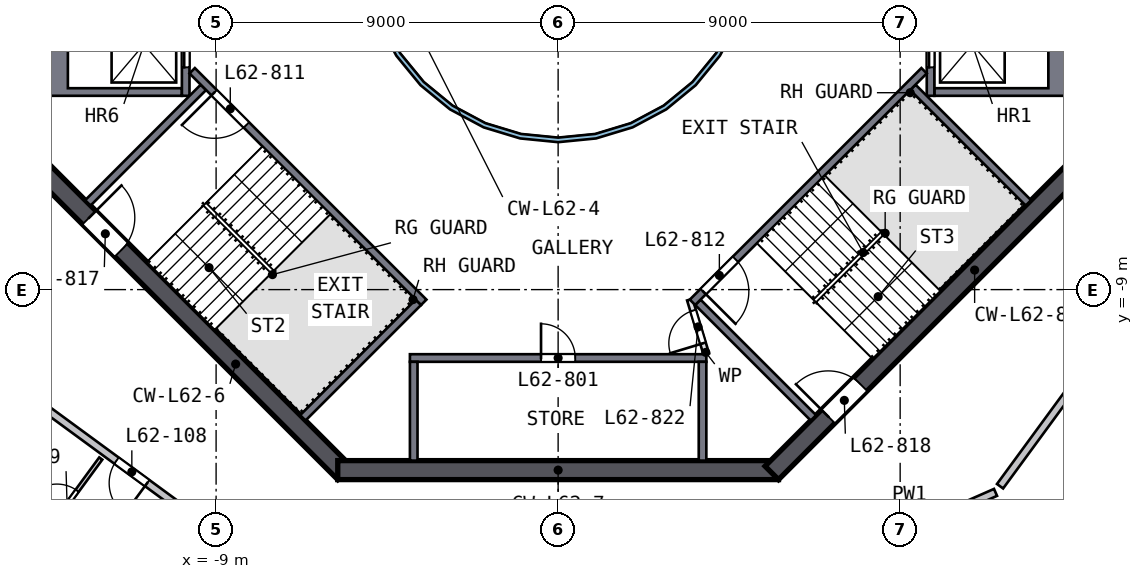
"""IFC4 building model, lengths in metres.
Left out: names, types, materials, properties, quantities, classifications, styles, units other than length and angle.
Written with IfcOpenShell. Run it as: python <this file> out.ifc"""

import sys

from ifc_helpers import new_model, si_unit, direction, frame, frame_2d, origin, place, context, subcontext, project, spatial, polyline, rectangle, outline, extrude, element, fill, save


model = new_model("IFC4")
c1 = context("Model", 3, precision=1e-05, world=origin(), true_north=direction((0.0, 1.0)))
c2 = subcontext(c1, "Body", "Model", "MODEL_VIEW")
j1 = project(units=[si_unit("LENGTHUNIT", "METRE"), si_unit("PLANEANGLEUNIT", "RADIAN")], contexts=[c1])
p1 = place(None, origin())
s1 = spatial("IfcSite", under=j1, at=p1, CompositionType="ELEMENT")
p2 = place(p1, origin())
s2 = spatial("IfcBuilding", under=s1, at=p2, CompositionType="ELEMENT")
p3 = place(p2, frame((0.0, 0.0, 252.5)))
s3 = spatial("IfcBuildingStorey", under=s2, at=p3, CompositionType="ELEMENT", Elevation=252.5)
p4 = place(p3, frame((-13.823, -5.622, 0.0), z_axis=(0.0, 0.0, 1.0), x_axis=(0.707106781, -0.707106781, 0.0)))
e1 = element("IfcWall", 1, at=p4, inside=s3, PredefinedType="SHEAR", context=c2, shape_type="SweptSolid", body=[
    extrude(rectangle(XDim=11.598, YDim=0.5, at=frame_2d((5.799, 0.0))), origin(), (0.0, 0.0, 1.0), 3.5),
])
p5 = place(p4, frame((2.099, 0.0, 0.0)))
e2 = element("IfcOpeningElement", 2, at=p5, cuts=e1, PredefinedType="OPENING", context=c2, shape_type="SweptSolid", body=[
    extrude(rectangle(XDim=1.2, YDim=2.1, at=frame_2d((0.6, 1.05))), frame((0.0, 0.26, 0.0), z_axis=(0.0, -1.0, 0.0), x_axis=(1.0, 0.0, 0.0)), (0.0, 0.0, 1.0), 0.52),
])
p6 = place(p3, frame((-5.799, -13.75, 0.0), z_axis=(0.0, 0.0, 1.0), x_axis=(1.0, 0.0, 0.0)))
e3 = element("IfcWall", 3, at=p6, inside=s3, PredefinedType="SHEAR", context=c2, shape_type="SweptSolid", body=[
    extrude(rectangle(XDim=11.598, YDim=0.5, at=frame_2d((5.799, 0.0))), origin(), (0.0, 0.0, 1.0), 3.5),
])
p7 = place(p3, frame((5.622, -13.823, 0.0), z_axis=(0.0, 0.0, 1.0), x_axis=(0.707106781, 0.707106781, 0.0)))
e4 = element("IfcWall", 4, at=p7, inside=s3, PredefinedType="SHEAR", context=c2, shape_type="SweptSolid", body=[
    extrude(rectangle(XDim=11.598, YDim=0.5, at=frame_2d((5.799, 0.0))), origin(), (0.0, 0.0, 1.0), 3.5),
])
p8 = place(p7, frame((2.099, 0.0, 0.0)))
e5 = element("IfcOpeningElement", 5, at=p8, cuts=e4, PredefinedType="OPENING", context=c2, shape_type="SweptSolid", body=[
    extrude(rectangle(XDim=1.2, YDim=2.1, at=frame_2d((0.6, 1.05))), frame((0.0, 0.26, 0.0), z_axis=(0.0, -1.0, 0.0), x_axis=(1.0, 0.0, 0.0)), (0.0, 0.0, 1.0), 0.52),
])
p9 = place(p3, origin())
e6 = element("IfcWall", 6, at=p9, inside=s3, PredefinedType="SOLIDWALL", context=c2, shape_type="SweptSolid", body=[
    extrude(outline(polyline([(13.5, -3.9), (9.9, -3.9), (9.9, -3.7), (12.9, -3.7), (12.9, -1.4), (9.9, -1.4), (9.9, -1.2), (13.5, -1.2), (13.5, -3.9)])), origin(), (0.0, 0.0, 1.0), 3.19),
])
p10 = place(p3, frame((9.8, -1.2, 0.0), z_axis=(0.0, 0.0, 1.0), x_axis=(0.0, -1.0, 0.0)))
e7 = element("IfcWall", 7, at=p10, inside=s3, PredefinedType="SOLIDWALL", context=c2, shape_type="SweptSolid", body=[
    extrude(rectangle(XDim=2.7, YDim=0.2, at=frame_2d((1.35, 0.0))), origin(), (0.0, 0.0, 1.0), 3.19),
])
p11 = place(p10, frame((0.75, 0.0, 0.0)))
e8 = element("IfcOpeningElement", 8, at=p11, cuts=e7, PredefinedType="OPENING", context=c2, shape_type="SweptSolid", body=[
    extrude(rectangle(XDim=1.2, YDim=2.1, at=frame_2d((0.6, 1.05))), frame((0.0, 0.11, 0.0), z_axis=(0.0, -1.0, 0.0), x_axis=(1.0, 0.0, 0.0)), (0.0, 0.0, 1.0), 0.22),
])
p12 = place(p3, origin())
e9 = element("IfcWall", 9, at=p12, inside=s3, PredefinedType="SOLIDWALL", context=c2, shape_type="SweptSolid", body=[
    extrude(outline(polyline([(-13.5, -3.9), (-13.5, -1.2), (-9.9, -1.2), (-9.9, -1.4), (-12.9, -1.4), (-12.9, -3.7), (-9.9, -3.7), (-9.9, -3.9), (-13.5, -3.9)])), origin(), (0.0, 0.0, 1.0), 3.19),
])
p13 = place(p3, frame((-9.8, -1.2, 0.0), z_axis=(0.0, 0.0, 1.0), x_axis=(0.0, -1.0, 0.0)))
e10 = element("IfcWall", 10, at=p13, inside=s3, PredefinedType="SOLIDWALL", context=c2, shape_type="SweptSolid", body=[
    extrude(rectangle(XDim=2.7, YDim=0.2, at=frame_2d((1.35, 0.0))), origin(), (0.0, 0.0, 1.0), 3.19),
])
p14 = place(p13, frame((0.75, 0.0, 0.0)))
e11 = element("IfcOpeningElement", 11, at=p14, cuts=e10, PredefinedType="OPENING", context=c2, shape_type="SweptSolid", body=[
    extrude(rectangle(XDim=1.2, YDim=2.1, at=frame_2d((0.6, 1.05))), frame((0.0, 0.11, 0.0), z_axis=(0.0, -1.0, 0.0), x_axis=(1.0, 0.0, 0.0)), (0.0, 0.0, 1.0), 0.22),
])
p15 = place(p3, frame((-3.9, -10.8, 0.0), z_axis=(0.0, 0.0, 1.0), x_axis=(1.0, 0.0, 0.0)))
e12 = element("IfcWall", 12, at=p15, inside=s3, PredefinedType="SOLIDWALL", context=c2, shape_type="SweptSolid", body=[
    extrude(rectangle(XDim=7.8, YDim=0.2, at=frame_2d((3.9, 0.0))), origin(), (0.0, 0.0, 1.0), 3.19),
])
p16 = place(p15, frame((3.45, 0.0, 0.0)))
e13 = element("IfcOpeningElement", 13, at=p16, cuts=e12, PredefinedType="OPENING", context=c2, shape_type="SweptSolid", body=[
    extrude(rectangle(XDim=0.9, YDim=2.1, at=frame_2d((0.45, 1.05))), frame((0.0, 0.11, 0.0), z_axis=(0.0, -1.0, 0.0), x_axis=(1.0, 0.0, 0.0)), (0.0, 0.0, 1.0), 0.22),
])
for number, where, z_axis, x_axis in (
    (14, (-3.8, -10.9, 0.0), (0.0, 0.0, 1.0), (0.0, -1.0, 0.0)),
    (15, (3.8, -10.9, 0.0), (0.0, 0.0, 1.0), (0.0, -1.0, 0.0)),
):
    element("IfcWall", number, at=place(p3, frame(where, z_axis=z_axis, x_axis=x_axis)), inside=s3, PredefinedType="SOLIDWALL", context=c2, shape_type="SweptSolid", body=[
        extrude(rectangle(XDim=2.6, YDim=0.2, at=frame_2d((1.3, 0.0))), origin(), (0.0, 0.0, 1.0), 3.19),
    ])
p17 = place(p3, frame((-3.535, -9.334, 0.0), z_axis=(0.0, 0.0, 1.0), x_axis=(-0.707120946, 0.707092617, 0.0)))
e16 = element("IfcWall", 16, at=p17, inside=s3, PredefinedType="SOLIDWALL", context=c2, shape_type="SweptSolid", body=[
    extrude(rectangle(XDim=8.618, YDim=0.2, at=frame_2d((4.309, 0.0))), origin(), (0.0, 0.0, 1.0), 3.19),
])
p18 = place(p17, frame((6.6, 0.0, 0.0)))
e17 = element("IfcOpeningElement", 17, at=p18, cuts=e16, PredefinedType="OPENING", context=c2, shape_type="SweptSolid", body=[
    extrude(rectangle(XDim=1.2, YDim=2.1, at=frame_2d((0.6, 1.05))), frame((0.0, 0.11, 0.0), z_axis=(0.0, -1.0, 0.0), x_axis=(1.0, 0.0, 0.0)), (0.0, 0.0, 1.0), 0.22),
])
for number, where, z_axis, x_axis in (
    (18, (-9.334, -3.677, 0.0), (0.0, 0.0, 1.0), (-0.707, -0.707, 0.0)),
    (19, (-3.677, -9.334, 0.0), (0.0, 0.0, 1.0), (-0.707, -0.707, 0.0)),
):
    element("IfcWall", number, at=place(p3, frame(where, z_axis=z_axis, x_axis=x_axis)), inside=s3, PredefinedType="SOLIDWALL", context=c2, shape_type="SweptSolid", body=[
        extrude(rectangle(XDim=4.3, YDim=0.2, at=frame_2d((2.15, 0.0))), origin(), (0.0, 0.0, 1.0), 3.19),
    ])
p19 = place(p3, frame((9.629, -3.24, 0.0), z_axis=(0.0, 0.0, 1.0), x_axis=(-0.707120946, -0.707092617, 0.0)))
e20 = element("IfcWall", 20, at=p19, inside=s3, PredefinedType="SOLIDWALL", context=c2, shape_type="SweptSolid", body=[
    extrude(rectangle(XDim=8.618, YDim=0.2, at=frame_2d((4.309, 0.0))), origin(), (0.0, 0.0, 1.0), 3.19),
])
p20 = place(p19, frame((7.018, 0.0, 0.0)))
e21 = element("IfcOpeningElement", 21, at=p20, cuts=e20, PredefinedType="OPENING", context=c2, shape_type="SweptSolid", body=[
    extrude(rectangle(XDim=1.2, YDim=2.1, at=frame_2d((0.6, 1.05))), frame((0.0, 0.11, 0.0), z_axis=(0.0, -1.0, 0.0), x_axis=(1.0, 0.0, 0.0)), (0.0, 0.0, 1.0), 0.22),
])
for number, where, z_axis, x_axis in (
    (22, (3.677, -9.334, 0.0), (0.0, 0.0, 1.0), (0.707, -0.707, 0.0)),
    (23, (9.334, -3.677, 0.0), (0.0, 0.0, 1.0), (0.707, -0.707, 0.0)),
):
    element("IfcWall", number, at=place(p3, frame(where, z_axis=z_axis, x_axis=x_axis)), inside=s3, PredefinedType="SOLIDWALL", context=c2, shape_type="SweptSolid", body=[
        extrude(rectangle(XDim=4.3, YDim=0.2, at=frame_2d((2.15, 0.0))), origin(), (0.0, 0.0, 1.0), 3.19),
    ])
p21 = place(p3, frame((3.9, -10.7, 0.0), z_axis=(0.0, 0.0, 1.0), x_axis=(-0.289808785, 0.957084567, 0.0)))
e24 = element("IfcWall", 24, at=p21, inside=s3, PredefinedType="PARTITIONING", context=c2, shape_type="SweptSolid", body=[
    extrude(rectangle(XDim=1.501, YDim=0.15, at=frame_2d((0.75, 0.0))), origin(), (0.0, 0.0, 1.0), 3.19),
])
p22 = place(p21, frame((0.301, 0.0, 0.0)))
e25 = element("IfcOpeningElement", 25, at=p22, cuts=e24, PredefinedType="OPENING", context=c2, shape_type="SweptSolid", body=[
    extrude(rectangle(XDim=0.9, YDim=2.1, at=frame_2d((0.45, 1.05))), frame((0.0, 0.085, 0.0), z_axis=(0.0, -1.0, 0.0), x_axis=(1.0, 0.0, 0.0)), (0.0, 0.0, 1.0), 0.17),
])
p23 = place(p3, origin())
e26 = element("IfcWall", 26, at=p23, inside=s3, PredefinedType="SOLIDWALL", context=c2, shape_type="SweptSolid", body=[
    extrude(outline(polyline([(5.021, -0.999), (4.73, -1.959), (4.257, -2.844), (3.62, -3.62), (2.844, -4.257), (1.959, -4.73), (0.999, -5.021), (0.0, -5.12), (-0.999, -5.021), (-1.959, -4.73), (-2.844, -4.257), (-3.62, -3.62), (-4.257, -2.844), (-4.73, -1.959), (-5.021, -0.999), (-5.12, 0.0), (-5.021, 0.999), (-4.73, 1.959), (-4.257, 2.844), (-3.62, 3.62), (-2.844, 4.257), (-1.959, 4.73), (-0.999, 5.021), (0.0, 5.12), (0.999, 5.021), (1.959, 4.73), (2.844, 4.257), (3.62, 3.62), (4.257, 2.844), (4.73, 1.959), (5.021, 0.999), (5.12, 0.0), (5.021, -0.999)]), holes=[polyline([(4.904, 0.976), (4.619, 1.913), (4.157, 2.778), (3.535, 3.535), (2.778, 4.157), (1.913, 4.619), (0.976, 4.904), (0.0, 5.0), (-0.976, 4.904), (-1.913, 4.619), (-2.778, 4.157), (-3.535, 3.535), (-4.157, 2.778), (-4.619, 1.913), (-4.904, 0.976), (-5.0, 0.0), (-4.904, -0.976), (-4.619, -1.913), (-4.157, -2.778), (-3.535, -3.535), (-2.778, -4.157), (-1.913, -4.619), (-0.976, -4.904), (0.0, -5.0), (0.976, -4.904), (1.913, -4.619), (2.778, -4.157), (3.535, -3.535), (4.157, -2.778), (4.619, -1.913), (4.904, -0.976), (5.0, 0.0), (4.904, 0.976)])]), origin(), (0.0, 0.0, 1.0), 3.19),
])
p24 = place(p3, frame((-6.66, -17.136, 0.0), z_axis=(0.0, 0.0, 1.0), x_axis=(-0.806536607, 0.591184152, 0.0)))
e27 = element("IfcWall", 27, at=p24, inside=s3, PredefinedType="SOLIDWALL", context=c2, shape_type="SweptSolid", body=[
    extrude(rectangle(XDim=9.317, YDim=0.2, at=frame_2d((4.658, 0.0))), origin(), (0.0, 0.0, 1.0), 3.19),
])
p25 = place(p24, frame((5.15, 0.0, 0.0)))
e28 = element("IfcOpeningElement", 28, at=p25, cuts=e27, PredefinedType="OPENING", context=c2, shape_type="SweptSolid", body=[
    extrude(rectangle(XDim=1.0, YDim=2.1, at=frame_2d((0.5, 1.05))), frame((0.0, 0.11, 0.0), z_axis=(0.0, -1.0, 0.0), x_axis=(1.0, 0.0, 0.0)), (0.0, 0.0, 1.0), 0.22),
])
p26 = place(p3, frame((11.51, -14.336, 0.0), z_axis=(0.0, 0.0, 1.0), x_axis=(-0.915247397, -0.402892297, 0.0)))
e29 = element("IfcWall", 29, at=p26, inside=s3, PredefinedType="SOLIDWALL", context=c2, shape_type="SweptSolid", body=[
    extrude(rectangle(XDim=9.316, YDim=0.2, at=frame_2d((4.658, 0.0))), origin(), (0.0, 0.0, 1.0), 3.19),
])
p27 = place(p26, frame((5.15, 0.0, 0.0)))
e30 = element("IfcOpeningElement", 30, at=p27, cuts=e29, PredefinedType="OPENING", context=c2, shape_type="SweptSolid", body=[
    extrude(rectangle(XDim=1.0, YDim=2.1, at=frame_2d((0.5, 1.05))), frame((0.0, 0.11, 0.0), z_axis=(0.0, -1.0, 0.0), x_axis=(1.0, 0.0, 0.0)), (0.0, 0.0, 1.0), 0.22),
])
p28 = place(p3, frame((17.017, -6.822, 0.0), z_axis=(0.0, 0.0, 1.0), x_axis=(-0.591166262, -0.80654972, 0.0)))
e31 = element("IfcWall", 31, at=p28, inside=s3, PredefinedType="SOLIDWALL", context=c2, shape_type="SweptSolid", body=[
    extrude(rectangle(XDim=9.116, YDim=0.2, at=frame_2d((4.558, 0.0))), origin(), (0.0, 0.0, 1.0), 3.19),
])
p29 = place(p28, frame((0.2, 0.0, 0.0)))
e32 = element("IfcOpeningElement", 32, at=p29, cuts=e31, PredefinedType="OPENING", context=c2, shape_type="SweptSolid", body=[
    extrude(rectangle(XDim=1.0, YDim=2.1, at=frame_2d((0.5, 1.05))), frame((0.0, 0.11, 0.0), z_axis=(0.0, -1.0, 0.0), x_axis=(1.0, 0.0, 0.0)), (0.0, 0.0, 1.0), 0.22),
])
p30 = place(p3, frame((-13.867, -15.945, 0.0), z_axis=(0.0, 0.0, 1.0), x_axis=(0.591155368, 0.806557704, 0.0)))
e33 = element("IfcWall", 33, at=p30, inside=s3, PredefinedType="PARTITIONING", context=c2, shape_type="SweptSolid", body=[
    extrude(rectangle(XDim=3.1, YDim=0.1, at=frame_2d((1.55, 0.0))), origin(), (0.0, 0.0, 1.0), 3.19),
])
p31 = place(p30, frame((1.15, 0.0, 0.0)))
e34 = element("IfcOpeningElement", 34, at=p31, cuts=e33, PredefinedType="OPENING", context=c2, shape_type="SweptSolid", body=[
    extrude(rectangle(XDim=0.9, YDim=2.1, at=frame_2d((0.45, 1.05))), frame((0.0, 0.06, 0.0), z_axis=(0.0, -1.0, 0.0), x_axis=(1.0, 0.0, 0.0)), (0.0, 0.0, 1.0), 0.12),
])
p32 = place(p16, origin())
e35 = element("IfcDoor", 35, at=p32, inside=s3, OperationType="SINGLE_SWING_LEFT", PredefinedType="DOOR", context=c2, shape_type="SweptSolid", body=[
    extrude(rectangle(XDim=0.9, YDim=2.1, at=frame_2d((0.45, 1.05))), frame((0.0, 0.025, 0.0), z_axis=(0.0, -1.0, 0.0), x_axis=(1.0, 0.0, 0.0)), (0.0, 0.0, 1.0), 0.05),
])
fill(e13, e35)
p33 = place(p11, origin())
e36 = element("IfcDoor", 36, at=p33, inside=s3, OperationType="DOUBLE_DOOR_SLIDING", PredefinedType="DOOR", context=c2, shape_type="SweptSolid", body=[
    extrude(rectangle(XDim=1.2, YDim=2.1, at=frame_2d((0.6, 1.05))), frame((0.0, 0.025, 0.0), z_axis=(0.0, -1.0, 0.0), x_axis=(1.0, 0.0, 0.0)), (0.0, 0.0, 1.0), 0.05),
])
fill(e8, e36)
p34 = place(p14, origin())
e37 = element("IfcDoor", 37, at=p34, inside=s3, OperationType="DOUBLE_DOOR_SLIDING", PredefinedType="DOOR", context=c2, shape_type="SweptSolid", body=[
    extrude(rectangle(XDim=1.2, YDim=2.1, at=frame_2d((0.6, 1.05))), frame((0.0, 0.025, 0.0), z_axis=(0.0, -1.0, 0.0), x_axis=(1.0, 0.0, 0.0)), (0.0, 0.0, 1.0), 0.05),
])
fill(e11, e37)
p35 = place(p18, origin())
e38 = element("IfcDoor", 38, at=p35, inside=s3, OperationType="SINGLE_SWING_RIGHT", PredefinedType="DOOR", context=c2, shape_type="SweptSolid", body=[
    extrude(rectangle(XDim=1.2, YDim=2.1, at=frame_2d((0.6, 1.05))), frame((0.0, 0.025, 0.0), z_axis=(0.0, -1.0, 0.0), x_axis=(1.0, 0.0, 0.0)), (0.0, 0.0, 1.0), 0.05),
])
fill(e17, e38)
p36 = place(p20, origin())
e39 = element("IfcDoor", 39, at=p36, inside=s3, OperationType="SINGLE_SWING_RIGHT", PredefinedType="DOOR", context=c2, shape_type="SweptSolid", body=[
    extrude(rectangle(XDim=1.2, YDim=2.1, at=frame_2d((0.6, 1.05))), frame((0.0, 0.025, 0.0), z_axis=(0.0, -1.0, 0.0), x_axis=(1.0, 0.0, 0.0)), (0.0, 0.0, 1.0), 0.05),
])
fill(e21, e39)
p37 = place(p5, origin())
e40 = element("IfcDoor", 40, at=p37, inside=s3, OperationType="SINGLE_SWING_LEFT", PredefinedType="DOOR", context=c2, shape_type="SweptSolid", body=[
    extrude(rectangle(XDim=1.2, YDim=2.1, at=frame_2d((0.6, 1.05))), frame((0.0, 0.025, 0.0), z_axis=(0.0, -1.0, 0.0), x_axis=(1.0, 0.0, 0.0)), (0.0, 0.0, 1.0), 0.05),
])
fill(e2, e40)
p38 = place(p8, origin())
e41 = element("IfcDoor", 41, at=p38, inside=s3, OperationType="SINGLE_SWING_LEFT", PredefinedType="DOOR", context=c2, shape_type="SweptSolid", body=[
    extrude(rectangle(XDim=1.2, YDim=2.1, at=frame_2d((0.6, 1.05))), frame((0.0, 0.025, 0.0), z_axis=(0.0, -1.0, 0.0), x_axis=(1.0, 0.0, 0.0)), (0.0, 0.0, 1.0), 0.05),
])
fill(e5, e41)
p39 = place(p22, origin())
e42 = element("IfcDoor", 42, at=p39, inside=s3, OperationType="SINGLE_SWING_LEFT", PredefinedType="DOOR", context=c2, shape_type="SweptSolid", body=[
    extrude(rectangle(XDim=0.9, YDim=2.1, at=frame_2d((0.45, 1.05))), frame((0.0, 0.025, 0.0), z_axis=(0.0, -1.0, 0.0), x_axis=(1.0, 0.0, 0.0)), (0.0, 0.0, 1.0), 0.05),
])
fill(e25, e42)
p40 = place(p25, origin())
e43 = element("IfcDoor", 43, at=p40, inside=s3, OperationType="SINGLE_SWING_LEFT", PredefinedType="DOOR", context=c2, shape_type="SweptSolid", body=[
    extrude(rectangle(XDim=1.0, YDim=2.1, at=frame_2d((0.5, 1.05))), frame((0.0, 0.025, 0.0), z_axis=(0.0, -1.0, 0.0), x_axis=(1.0, 0.0, 0.0)), (0.0, 0.0, 1.0), 0.05),
])
fill(e28, e43)
p41 = place(p31, origin())
e44 = element("IfcDoor", 44, at=p41, inside=s3, OperationType="SINGLE_SWING_LEFT", PredefinedType="DOOR", context=c2, shape_type="SweptSolid", body=[
    extrude(rectangle(XDim=0.9, YDim=2.1, at=frame_2d((0.45, 1.05))), frame((0.0, 0.025, 0.0), z_axis=(0.0, -1.0, 0.0), x_axis=(1.0, 0.0, 0.0)), (0.0, 0.0, 1.0), 0.05),
])
fill(e34, e44)
save(model, sys.argv[1])
